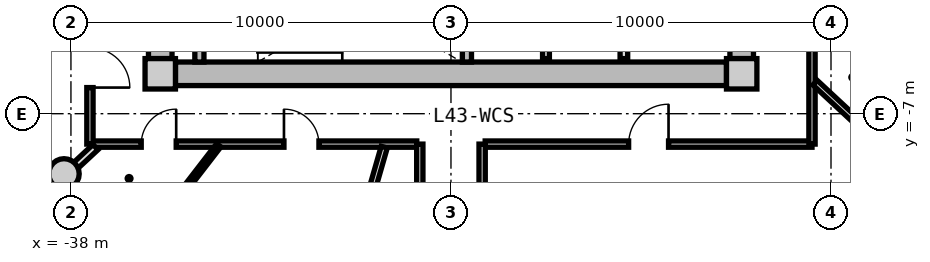
"""IFC4 building model, lengths in metres.
Left out: names, types, materials, properties, quantities, classifications, styles, units other than length and angle.
Written with IfcOpenShell. Run it as: python <this file> out.ifc"""

import sys

from ifc_helpers import new_model, si_unit, direction, frame, frame_2d, origin, origin_2d, place, context, subcontext, project, spatial, rectangle, circle, extrude, source, transform, mapped, element, fill, save


model = new_model("IFC4")
c1 = context("Model", 3, precision=1e-05, world=origin(), true_north=direction((0.0, 1.0)))
c2 = subcontext(c1, "Body", "Model", "MODEL_VIEW")
j1 = project(units=[si_unit("LENGTHUNIT", "METRE"), si_unit("PLANEANGLEUNIT", "RADIAN")], contexts=[c1])
p1 = place(None, origin())
s1 = spatial("IfcSite", under=j1, at=p1, CompositionType="ELEMENT")
p2 = place(p1, origin())
s2 = spatial("IfcBuilding", under=s1, at=p2, CompositionType="ELEMENT")
p3 = place(p2, frame((0.0, 0.0, 140.4)))
s3 = spatial("IfcBuildingStorey", under=s2, at=p3, CompositionType="ELEMENT", Elevation=140.4)
m1 = source(origin(), c2, "Body", "SweptSolid", [
    extrude(rectangle(XDim=0.8, YDim=0.8, at=origin_2d()), origin(), (0.0, 0.0, 1.0), 3.05),
])
for number, where, z_axis, x_axis in (
    (1, (-35.65, -5.95, 0.0), (0.0, 0.0, 1.0), (1.0, 0.0, 0.0)),
    (2, (-20.35, -5.95, 0.0), (0.0, 0.0, 1.0), (1.0, 0.0, 0.0)),
):
    element("IfcColumn", number, at=place(p3, frame(where, z_axis=z_axis, x_axis=x_axis)), inside=s3, PredefinedType="COLUMN", context=c2, shape_type="MappedRepresentation", body=[
        mapped(m1, transform((0.0, 0.0, 0.0), x_axis=(1.0, 0.0, 0.0), y_axis=(0.0, 1.0, 0.0), z_axis=(0.0, 0.0, 1.0), scale=1.0)),
    ])
m2 = source(origin(), c2, "Body", "SweptSolid", [
    extrude(rectangle(XDim=14.5, YDim=0.62, at=frame_2d((7.25, 0.0))), origin(), (0.0, 0.0, 1.0), 2.81),
])
p4 = place(p3, frame((-20.75, -5.95, 0.0), z_axis=(0.0, 0.0, 1.0), x_axis=(-1.0, 0.0, 0.0)))
e3 = element("IfcWall", 3, at=p4, inside=s3, PredefinedType="SHEAR", context=c2, shape_type="MappedRepresentation", body=[
    mapped(m2, transform((0.0, 0.0, 0.0), x_axis=(1.0, 0.0, 0.0), y_axis=(0.0, 1.0, 0.0), z_axis=(0.0, 0.0, 1.0), scale=1.0)),
])
m3 = source(origin(), c2, "Body", "SweptSolid", [
    extrude(rectangle(XDim=11.1, YDim=0.62, at=frame_2d((5.55, 0.0))), origin(), (0.0, 0.0, 1.0), 2.81),
])
p5 = place(p3, frame((-35.65, -5.55, 0.0), z_axis=(0.0, 0.0, 1.0), x_axis=(0.0, 1.0, 0.0)))
e4 = element("IfcWall", 4, at=p5, inside=s3, PredefinedType="SHEAR", context=c2, shape_type="MappedRepresentation", body=[
    mapped(m3, transform((0.0, 0.0, 0.0), x_axis=(1.0, 0.0, 0.0), y_axis=(0.0, 1.0, 0.0), z_axis=(0.0, 0.0, 1.0), scale=1.0)),
])
p6 = place(p5, frame((3.8, 0.0, 0.0)))
e5 = element("IfcOpeningElement", 5, at=p6, cuts=e4, PredefinedType="OPENING", context=c2, shape_type="SweptSolid", body=[
    extrude(rectangle(XDim=1.2, YDim=2.15, at=frame_2d((0.6, 1.075))), frame((0.0, 0.32, 0.0), z_axis=(0.0, -1.0, 0.0), x_axis=(1.0, 0.0, 0.0)), (0.0, 0.0, 1.0), 0.64),
])
p7 = place(p3, frame((-20.35, 5.55, 0.0), z_axis=(0.0, 0.0, 1.0), x_axis=(0.0, -1.0, 0.0)))
e6 = element("IfcWall", 6, at=p7, inside=s3, PredefinedType="SHEAR", context=c2, shape_type="MappedRepresentation", body=[
    mapped(m3, transform((0.0, 0.0, 0.0), x_axis=(1.0, 0.0, 0.0), y_axis=(0.0, 1.0, 0.0), z_axis=(0.0, 0.0, 1.0), scale=1.0)),
])
p8 = place(p7, frame((5.65, 0.0, 0.0)))
e7 = element("IfcOpeningElement", 7, at=p8, cuts=e6, PredefinedType="OPENING", context=c2, shape_type="SweptSolid", body=[
    extrude(rectangle(XDim=1.2, YDim=2.15, at=frame_2d((0.6, 1.075))), frame((0.0, 0.32, 0.0), z_axis=(0.0, -1.0, 0.0), x_axis=(1.0, 0.0, 0.0)), (0.0, 0.0, 1.0), 0.64),
])
m4 = source(origin(), c2, "Body", "SweptSolid", [
    extrude(circle(Radius=0.4, at=origin_2d()), origin(), (0.0, 0.0, 1.0), 3.05),
])
p9 = place(p3, frame((-38.183, -8.584, 0.0), z_axis=(0.0, 0.0, 1.0), x_axis=(1.0, 0.0, 0.0)))
e8 = element("IfcColumn", 8, at=p9, inside=s3, PredefinedType="COLUMN", context=c2, shape_type="MappedRepresentation", body=[
    mapped(m4, transform((0.0, 0.0, 0.0), x_axis=(1.0, 0.0, 0.0), y_axis=(0.0, 1.0, 0.0), z_axis=(0.0, 0.0, 1.0), scale=1.0)),
])
m5 = source(origin(), c2, "Body", "SweptSolid", [
    extrude(rectangle(XDim=3.19, YDim=0.24, at=frame_2d((1.595, 0.0))), origin(), (0.0, 0.0, 1.0), 2.81),
])
for number, where, z_axis, x_axis in (
    (9, (-34.62, -5.64, 0.0), (0.0, 0.0, 1.0), (0.0, 1.0, 0.0)),
    (10, (-27.58, -5.64, 0.0), (0.0, 0.0, 1.0), (0.0, 1.0, 0.0)),
):
    element("IfcWall", number, at=place(p3, frame(where, z_axis=z_axis, x_axis=x_axis)), inside=s3, PredefinedType="PARTITIONING", context=c2, shape_type="MappedRepresentation", body=[
        mapped(m5, transform((0.0, 0.0, 0.0), x_axis=(1.0, 0.0, 0.0), y_axis=(0.0, 1.0, 0.0), z_axis=(0.0, 0.0, 1.0), scale=1.0)),
    ])
m6 = source(origin(), c2, "Body", "SweptSolid", [
    extrude(rectangle(XDim=3.8, YDim=0.2, at=frame_2d((1.9, 0.0))), origin(), (0.0, 0.0, 1.0), 2.795),
])
p10 = place(p3, frame((-23.45, -5.55, 0.0), z_axis=(0.0, 0.0, 1.0), x_axis=(0.0, 1.0, 0.0)))
e11 = element("IfcWall", 11, at=p10, inside=s3, PredefinedType="PARTITIONING", context=c2, shape_type="MappedRepresentation", body=[
    mapped(m6, transform((0.0, 0.0, 0.0), x_axis=(1.0, 0.0, 0.0), y_axis=(0.0, 1.0, 0.0), z_axis=(0.0, 0.0, 1.0), scale=1.0)),
])
m7 = source(origin(), c2, "Body", "SweptSolid", [
    extrude(rectangle(XDim=3.22, YDim=0.18, at=frame_2d((1.61, 0.0))), origin(), (0.0, 0.0, 1.0), 2.795),
])
p11 = place(p3, frame((-25.5, -5.55, 0.0), z_axis=(0.0, 0.0, 1.0), x_axis=(0.0, 1.0, 0.0)))
e12 = element("IfcWall", 12, at=p11, inside=s3, PredefinedType="PARTITIONING", context=c2, shape_type="MappedRepresentation", body=[
    mapped(m7, transform((0.0, 0.0, 0.0), x_axis=(1.0, 0.0, 0.0), y_axis=(0.0, 1.0, 0.0), z_axis=(0.0, 0.0, 1.0), scale=1.0)),
])
m8 = source(origin(), c2, "Body", "SweptSolid", [
    extrude(rectangle(XDim=8.6, YDim=0.165, at=frame_2d((4.3, 0.0))), origin(), (0.0, 0.0, 1.0), 2.795),
])
p12 = place(p3, frame((-18.5, -7.8, 0.0), z_axis=(0.0, 0.0, 1.0), x_axis=(-1.0, 0.0, 0.0)))
e13 = element("IfcWall", 13, at=p12, inside=s3, PredefinedType="PARTITIONING", context=c2, shape_type="MappedRepresentation", body=[
    mapped(m8, transform((0.0, 0.0, 0.0), x_axis=(1.0, 0.0, 0.0), y_axis=(0.0, 1.0, 0.0), z_axis=(0.0, 0.0, 1.0), scale=1.0)),
])
p13 = place(p12, frame((3.775, 0.0, 0.0)))
e14 = element("IfcOpeningElement", 14, at=p13, cuts=e13, PredefinedType="OPENING", context=c2, shape_type="SweptSolid", body=[
    extrude(rectangle(XDim=1.05, YDim=2.15, at=frame_2d((0.525, 1.075))), frame((0.0, 0.093, 0.0), z_axis=(0.0, -1.0, 0.0), x_axis=(1.0, 0.0, 0.0)), (0.0, 0.0, 1.0), 0.185),
])
p14 = place(p3, frame((-28.9, -7.8, 0.0), z_axis=(0.0, 0.0, 1.0), x_axis=(-1.0, 0.0, 0.0)))
e15 = element("IfcWall", 15, at=p14, inside=s3, PredefinedType="PARTITIONING", context=c2, shape_type="MappedRepresentation", body=[
    mapped(m8, transform((0.0, 0.0, 0.0), x_axis=(1.0, 0.0, 0.0), y_axis=(0.0, 1.0, 0.0), z_axis=(0.0, 0.0, 1.0), scale=1.0)),
])
p15 = place(p14, frame((6.33, 0.0, 0.0)))
e16 = element("IfcOpeningElement", 16, at=p15, cuts=e15, PredefinedType="OPENING", context=c2, shape_type="SweptSolid", body=[
    extrude(rectangle(XDim=0.92, YDim=2.1, at=frame_2d((0.46, 1.05))), frame((0.0, 0.093, 0.0), z_axis=(0.0, -1.0, 0.0), x_axis=(1.0, 0.0, 0.0)), (0.0, 0.0, 1.0), 0.185),
])
p16 = place(p14, frame((2.575, 0.0, 0.0)))
e17 = element("IfcOpeningElement", 17, at=p16, cuts=e15, PredefinedType="OPENING", context=c2, shape_type="SweptSolid", body=[
    extrude(rectangle(XDim=0.92, YDim=2.1, at=frame_2d((0.46, 1.05))), frame((0.0, 0.093, 0.0), z_axis=(0.0, -1.0, 0.0), x_axis=(1.0, 0.0, 0.0)), (0.0, 0.0, 1.0), 0.185),
])
m9 = source(origin(), c2, "Body", "SweptSolid", [
    extrude(rectangle(XDim=15.6, YDim=0.165, at=frame_2d((7.8, 0.0))), origin(), (0.0, 0.0, 1.0), 2.795),
])
p17 = place(p3, frame((-37.5, -7.8, 0.0), z_axis=(0.0, 0.0, 1.0), x_axis=(0.0, 1.0, 0.0)))
e18 = element("IfcWall", 18, at=p17, inside=s3, PredefinedType="PARTITIONING", context=c2, shape_type="MappedRepresentation", body=[
    mapped(m9, transform((0.0, 0.0, 0.0), x_axis=(1.0, 0.0, 0.0), y_axis=(0.0, 1.0, 0.0), z_axis=(0.0, 0.0, 1.0), scale=1.0)),
])
p18 = place(p17, frame((8.95, 0.0, 0.0)))
e19 = element("IfcOpeningElement", 19, at=p18, cuts=e18, PredefinedType="OPENING", context=c2, shape_type="SweptSolid", body=[
    extrude(rectangle(XDim=1.25, YDim=2.2, at=frame_2d((0.625, 1.1))), frame((0.0, 0.093, 0.0), z_axis=(0.0, -1.0, 0.0), x_axis=(1.0, 0.0, 0.0)), (0.0, 0.0, 1.0), 0.185),
])
p19 = place(p17, frame((4.851, 0.0, 0.0)))
e20 = element("IfcOpeningElement", 20, at=p19, cuts=e18, PredefinedType="OPENING", context=c2, shape_type="SweptSolid", body=[
    extrude(rectangle(XDim=1.05, YDim=2.15, at=frame_2d((0.525, 1.075))), frame((0.0, 0.093, 0.0), z_axis=(0.0, -1.0, 0.0), x_axis=(1.0, 0.0, 0.0)), (0.0, 0.0, 1.0), 0.185),
])
p20 = place(p17, frame((1.488, 0.0, 0.0)))
e21 = element("IfcOpeningElement", 21, at=p20, cuts=e18, PredefinedType="OPENING", context=c2, shape_type="SweptSolid", body=[
    extrude(rectangle(XDim=1.05, YDim=2.15, at=frame_2d((0.525, 1.075))), frame((0.0, 0.093, 0.0), z_axis=(0.0, -1.0, 0.0), x_axis=(1.0, 0.0, 0.0)), (0.0, 0.0, 1.0), 0.185),
])
p21 = place(p3, frame((-18.5, 7.8, 0.0), z_axis=(0.0, 0.0, 1.0), x_axis=(0.0, -1.0, 0.0)))
e22 = element("IfcWall", 22, at=p21, inside=s3, PredefinedType="PARTITIONING", context=c2, shape_type="MappedRepresentation", body=[
    mapped(m9, transform((0.0, 0.0, 0.0), x_axis=(1.0, 0.0, 0.0), y_axis=(0.0, 1.0, 0.0), z_axis=(0.0, 0.0, 1.0), scale=1.0)),
])
p22 = place(p21, frame((10.881, 0.0, 0.0)))
e23 = element("IfcOpeningElement", 23, at=p22, cuts=e22, PredefinedType="OPENING", context=c2, shape_type="SweptSolid", body=[
    extrude(rectangle(XDim=1.05, YDim=2.15, at=frame_2d((0.525, 1.075))), frame((0.0, 0.093, 0.0), z_axis=(0.0, -1.0, 0.0), x_axis=(1.0, 0.0, 0.0)), (0.0, 0.0, 1.0), 0.185),
])
p23 = place(p21, frame((8.844, 0.0, 0.0)))
e24 = element("IfcOpeningElement", 24, at=p23, cuts=e22, PredefinedType="OPENING", context=c2, shape_type="SweptSolid", body=[
    extrude(rectangle(XDim=1.05, YDim=2.15, at=frame_2d((0.525, 1.075))), frame((0.0, 0.093, 0.0), z_axis=(0.0, -1.0, 0.0), x_axis=(1.0, 0.0, 0.0)), (0.0, 0.0, 1.0), 0.185),
])
p24 = place(p21, frame((3.596, 0.0, 0.0)))
e25 = element("IfcOpeningElement", 25, at=p24, cuts=e22, PredefinedType="OPENING", context=c2, shape_type="SweptSolid", body=[
    extrude(rectangle(XDim=1.25, YDim=2.2, at=frame_2d((0.625, 1.1))), frame((0.0, 0.093, 0.0), z_axis=(0.0, -1.0, 0.0), x_axis=(1.0, 0.0, 0.0)), (0.0, 0.0, 1.0), 0.185),
])
m10 = source(origin(), c2, "Body", "SweptSolid", [
    extrude(rectangle(XDim=6.035, YDim=0.165, at=frame_2d((3.018, 0.0))), origin(), (0.0, 0.0, 1.0), 2.345),
])
p25 = place(p3, frame((-29.756, -7.88, 0.0), z_axis=(0.0, 0.0, 1.0), x_axis=(-0.276809454862, -0.960924828329, 0.0)))
e26 = element("IfcWall", 26, at=p25, inside=s3, PredefinedType="PARTITIONING", context=c2, shape_type="MappedRepresentation", body=[
    mapped(m10, transform((0.0, 0.0, 0.0), x_axis=(1.0, 0.0, 0.0), y_axis=(0.0, 1.0, 0.0), z_axis=(0.0, 0.0, 1.0), scale=1.0)),
])
m11 = source(origin(), c2, "Body", "SweptSolid", [
    extrude(rectangle(XDim=4.927, YDim=0.165, at=frame_2d((2.463, 0.0))), origin(), (0.0, 0.0, 1.0), 2.345),
])
p26 = place(p3, frame((-18.42, -6.183, 0.0), z_axis=(0.0, 0.0, 1.0), x_axis=(0.732191335987, -0.681098999783, 0.0)))
e27 = element("IfcWall", 27, at=p26, inside=s3, PredefinedType="PARTITIONING", context=c2, shape_type="MappedRepresentation", body=[
    mapped(m11, transform((0.0, 0.0, 0.0), x_axis=(1.0, 0.0, 0.0), y_axis=(0.0, 1.0, 0.0), z_axis=(0.0, 0.0, 1.0), scale=1.0)),
])
m12 = source(origin(), c2, "Body", "SweptSolid", [
    extrude(rectangle(XDim=4.685, YDim=0.165, at=frame_2d((2.342, 0.0))), origin(), (0.0, 0.0, 1.0), 2.795),
])
p27 = place(p3, frame((-28.82, -12.485, 0.0), z_axis=(0.0, 0.0, 1.0), x_axis=(0.0, 1.0, 0.0)))
e28 = element("IfcWall", 28, at=p27, inside=s3, PredefinedType="PARTITIONING", context=c2, shape_type="MappedRepresentation", body=[
    mapped(m12, transform((0.0, 0.0, 0.0), x_axis=(1.0, 0.0, 0.0), y_axis=(0.0, 1.0, 0.0), z_axis=(0.0, 0.0, 1.0), scale=1.0)),
])
p28 = place(p27, frame((1.817, 0.0, 0.0)))
e29 = element("IfcOpeningElement", 29, at=p28, cuts=e28, PredefinedType="OPENING", context=c2, shape_type="SweptSolid", body=[
    extrude(rectangle(XDim=1.05, YDim=2.15, at=frame_2d((0.525, 1.075))), frame((0.0, 0.093, 0.0), z_axis=(0.0, -1.0, 0.0), x_axis=(1.0, 0.0, 0.0)), (0.0, 0.0, 1.0), 0.185),
])
p29 = place(p3, frame((-27.18, -12.485, 0.0), z_axis=(0.0, 0.0, 1.0), x_axis=(0.0, 1.0, 0.0)))
e30 = element("IfcWall", 30, at=p29, inside=s3, PredefinedType="PARTITIONING", context=c2, shape_type="MappedRepresentation", body=[
    mapped(m12, transform((0.0, 0.0, 0.0), x_axis=(1.0, 0.0, 0.0), y_axis=(0.0, 1.0, 0.0), z_axis=(0.0, 0.0, 1.0), scale=1.0)),
])
m13 = source(origin(), c2, "Body", "SweptSolid", [
    extrude(rectangle(XDim=2.435, YDim=0.19, at=frame_2d((1.217, 0.0))), origin(), (0.0, 0.0, 1.0), 2.345),
])
p30 = place(p3, frame((-37.354, -7.88, 0.0), z_axis=(0.0, 0.0, 1.0), x_axis=(-0.732164643118, -0.681127693878, 0.0)))
e31 = element("IfcWall", 31, at=p30, inside=s3, PredefinedType="PARTITIONING", context=c2, shape_type="MappedRepresentation", body=[
    mapped(m13, transform((0.0, 0.0, 0.0), x_axis=(1.0, 0.0, 0.0), y_axis=(0.0, 1.0, 0.0), z_axis=(0.0, 0.0, 1.0), scale=1.0)),
])
m14 = source(origin(), c2, "Body", "SweptSolid", [
    extrude(rectangle(XDim=4.335, YDim=0.19, at=frame_2d((2.168, 0.0))), origin(), (0.0, 0.0, 1.0), 2.795),
])
p31 = place(p3, frame((-37.53, -3.926, 0.0), z_axis=(0.0, 0.0, 1.0), x_axis=(-0.884108234352, -0.4672821738, 0.0)))
e32 = element("IfcWall", 32, at=p31, inside=s3, PredefinedType="PARTITIONING", context=c2, shape_type="MappedRepresentation", body=[
    mapped(m14, transform((0.0, 0.0, 0.0), x_axis=(1.0, 0.0, 0.0), y_axis=(0.0, 1.0, 0.0), z_axis=(0.0, 0.0, 1.0), scale=1.0)),
])
m15 = source(origin(), c2, "Body", "SweptSolid", [
    extrude(rectangle(XDim=3.937, YDim=0.14, at=frame_2d((1.968, 0.0))), origin(), (0.0, 0.0, 1.0), 2.795),
])
p32 = place(p3, frame((-34.11, -7.83, 0.0), z_axis=(0.0, 0.0, 1.0), x_axis=(-0.611016723561, -0.791617687731, 0.0)))
e33 = element("IfcWall", 33, at=p32, inside=s3, PredefinedType="PARTITIONING", context=c2, shape_type="MappedRepresentation", body=[
    mapped(m15, transform((0.0, 0.0, 0.0), x_axis=(1.0, 0.0, 0.0), y_axis=(0.0, 1.0, 0.0), z_axis=(0.0, 0.0, 1.0), scale=1.0)),
])
m16 = source(origin(), c2, "Body", "SweptSolid", [
    extrude(rectangle(XDim=6.499, YDim=0.19, at=frame_2d((3.25, 0.0))), origin(), (0.0, 0.0, 1.0), 2.795),
])
p33 = place(p3, frame((-18.324, -2.898, 0.0), z_axis=(0.0, 0.0, 1.0), x_axis=(0.882700013711, -0.469936895545, 0.0)))
e34 = element("IfcWall", 34, at=p33, inside=s3, PredefinedType="PARTITIONING", context=c2, shape_type="MappedRepresentation", body=[
    mapped(m16, transform((0.0, 0.0, 0.0), x_axis=(1.0, 0.0, 0.0), y_axis=(0.0, 1.0, 0.0), z_axis=(0.0, 0.0, 1.0), scale=1.0)),
])
m17 = source(origin(), c2, "Body", "SweptSolid", [
    extrude(rectangle(XDim=2.563, YDim=0.14, at=frame_2d((1.282, 0.0))), origin(), (0.0, 0.0, 1.0), 2.795),
])
p34 = place(p3, frame((-18.47, -4.397, 0.0), z_axis=(0.0, 0.0, 1.0), x_axis=(0.809308208957, -0.587384220859, 0.0)))
e35 = element("IfcWall", 35, at=p34, inside=s3, PredefinedType="PARTITIONING", context=c2, shape_type="MappedRepresentation", body=[
    mapped(m17, transform((0.0, 0.0, 0.0), x_axis=(1.0, 0.0, 0.0), y_axis=(0.0, 1.0, 0.0), z_axis=(0.0, 0.0, 1.0), scale=1.0)),
])
p35 = place(p34, frame((0.822, 0.0, 0.0)))
e36 = element("IfcOpeningElement", 36, at=p35, cuts=e35, PredefinedType="OPENING", context=c2, shape_type="SweptSolid", body=[
    extrude(rectangle(XDim=0.92, YDim=2.1, at=frame_2d((0.46, 1.05))), frame((0.0, 0.08, 0.0), z_axis=(0.0, -1.0, 0.0), x_axis=(1.0, 0.0, 0.0)), (0.0, 0.0, 1.0), 0.16),
])
m18 = source(origin(), c2, "Body", "SweptSolid", [
    extrude(rectangle(XDim=1.05, YDim=2.15, at=frame_2d((0.525, 1.075))), frame((0.0, 0.025, 0.0), z_axis=(0.0, -1.0, 0.0), x_axis=(1.0, 0.0, 0.0)), (0.0, 0.0, 1.0), 0.05),
])
p36 = place(p13, frame((1.05, 0.0, 0.0), z_axis=(0.0, 0.0, 1.0), x_axis=(-1.0, 0.0, 0.0)))
e37 = element("IfcDoor", 37, at=p36, inside=s3, OperationType="SINGLE_SWING_RIGHT", PredefinedType="DOOR", context=c2, shape_type="MappedRepresentation", body=[
    mapped(m18, transform((0.0, 0.0, 0.0), x_axis=(1.0, 0.0, 0.0), y_axis=(0.0, 1.0, 0.0), z_axis=(0.0, 0.0, 1.0), scale=1.0)),
])
fill(e14, e37)
p37 = place(p20, frame((1.05, 0.0, 0.0), z_axis=(0.0, 0.0, 1.0), x_axis=(-1.0, 0.0, 0.0)))
e38 = element("IfcDoor", 38, at=p37, inside=s3, OperationType="SINGLE_SWING_RIGHT", PredefinedType="DOOR", context=c2, shape_type="MappedRepresentation", body=[
    mapped(m18, transform((0.0, 0.0, 0.0), x_axis=(1.0, 0.0, 0.0), y_axis=(0.0, 1.0, 0.0), z_axis=(0.0, 0.0, 1.0), scale=1.0)),
])
fill(e21, e38)
m19 = source(origin(), c2, "Body", "SweptSolid", [
    extrude(rectangle(XDim=0.92, YDim=2.1, at=frame_2d((0.46, 1.05))), frame((0.0, 0.025, 0.0), z_axis=(0.0, -1.0, 0.0), x_axis=(1.0, 0.0, 0.0)), (0.0, 0.0, 1.0), 0.05),
])
p38 = place(p15, frame((0.92, 0.0, 0.0), z_axis=(0.0, 0.0, 1.0), x_axis=(-1.0, 0.0, 0.0)))
e39 = element("IfcDoor", 39, at=p38, inside=s3, OperationType="SINGLE_SWING_RIGHT", PredefinedType="DOOR", context=c2, shape_type="MappedRepresentation", body=[
    mapped(m19, transform((0.0, 0.0, 0.0), x_axis=(1.0, 0.0, 0.0), y_axis=(0.0, 1.0, 0.0), z_axis=(0.0, 0.0, 1.0), scale=1.0)),
])
fill(e16, e39)
p39 = place(p16, frame((0.92, 0.0, 0.0), z_axis=(0.0, 0.0, 1.0), x_axis=(-1.0, 0.0, 0.0)))
e40 = element("IfcDoor", 40, at=p39, inside=s3, OperationType="SINGLE_SWING_LEFT", PredefinedType="DOOR", context=c2, shape_type="MappedRepresentation", body=[
    mapped(m19, transform((0.0, 0.0, 0.0), x_axis=(1.0, 0.0, 0.0), y_axis=(0.0, 1.0, 0.0), z_axis=(0.0, 0.0, 1.0), scale=1.0)),
])
fill(e17, e40)
p40 = place(p35, origin())
e41 = element("IfcDoor", 41, at=p40, inside=s3, OperationType="SINGLE_SWING_RIGHT", PredefinedType="DOOR", context=c2, shape_type="MappedRepresentation", body=[
    mapped(m19, transform((0.0, 0.0, 0.0), x_axis=(1.0, 0.0, 0.0), y_axis=(0.0, 1.0, 0.0), z_axis=(0.0, 0.0, 1.0), scale=1.0)),
])
fill(e36, e41)
save(model, sys.argv[1])
